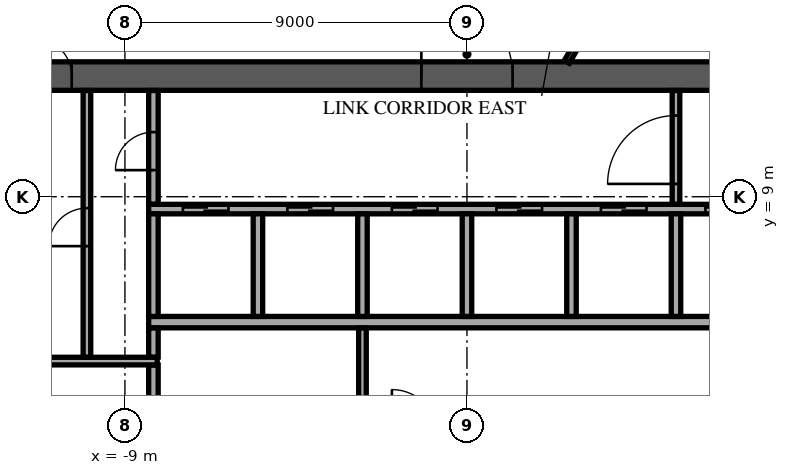
"""IFC4 building model, lengths in metres.
Left out: names, types, materials, properties, quantities, classifications, styles, units other than length and angle.
Written with IfcOpenShell. Run it as: python <this file> out.ifc"""

import sys

from ifc_helpers import new_model, si_unit, direction, frame, frame_2d, origin, place, context, subcontext, project, spatial, rectangle, extrude, element, fill, save


model = new_model("IFC4")
c1 = context("Model", 3, precision=1e-05, world=origin(), true_north=direction((0.0, 1.0)))
c2 = subcontext(c1, "Body", "Model", "MODEL_VIEW")
j1 = project(units=[si_unit("LENGTHUNIT", "METRE"), si_unit("PLANEANGLEUNIT", "RADIAN")], contexts=[c1])
p1 = place(None, origin())
s1 = spatial("IfcSite", under=j1, at=p1, CompositionType="ELEMENT")
p2 = place(p1, origin())
s2 = spatial("IfcBuilding", under=s1, at=p2, CompositionType="ELEMENT")
p3 = place(p2, frame((0.0, 0.0, 262.9)))
s3 = spatial("IfcBuildingStorey", under=s2, at=p3, CompositionType="ELEMENT", Elevation=262.9)
p4 = place(p3, frame((-12.55, 12.175, 0.0), z_axis=(0.0, 0.0, 1.0), x_axis=(1.0, 0.0, 0.0)))
e1 = element("IfcWall", 1, at=p4, inside=s3, PredefinedType="SHEAR", context=c2, shape_type="SweptSolid", body=[
    extrude(rectangle(XDim=25.1, YDim=0.75, at=frame_2d((12.55, 0.0))), origin(), (0.0, 0.0, 1.0), 3.64),
])
p5 = place(p4, frame((11.35, 0.0, 0.0)))
e2 = element("IfcOpeningElement", 2, at=p5, cuts=e1, PredefinedType="OPENING", context=c2, shape_type="SweptSolid", body=[
    extrude(rectangle(XDim=2.4, YDim=2.4, at=frame_2d((1.2, 1.2))), frame((0.0, 0.385, 0.0), z_axis=(0.0, -1.0, 0.0), x_axis=(1.0, 0.0, 0.0)), (0.0, 0.0, 1.0), 0.77),
])
p6 = place(p4, frame((22.175, 0.0, 0.0)))
e3 = element("IfcOpeningElement", 3, at=p6, cuts=e1, PredefinedType="OPENING", context=c2, shape_type="SweptSolid", body=[
    extrude(rectangle(XDim=1.2, YDim=2.1, at=frame_2d((0.6, 1.05))), frame((0.0, 0.385, 0.0), z_axis=(0.0, -1.0, 0.0), x_axis=(1.0, 0.0, 0.0)), (0.0, 0.0, 1.0), 0.77),
])
p7 = place(p4, frame((1.15, 0.0, 0.0)))
e4 = element("IfcOpeningElement", 4, at=p7, cuts=e1, PredefinedType="OPENING", context=c2, shape_type="SweptSolid", body=[
    extrude(rectangle(XDim=1.0, YDim=2.1, at=frame_2d((0.5, 1.05))), frame((0.0, 0.385, 0.0), z_axis=(0.0, -1.0, 0.0), x_axis=(1.0, 0.0, 0.0)), (0.0, 0.0, 1.0), 0.77),
])
p8 = place(p3, frame((-8.375, 5.7, 0.0), z_axis=(0.0, 0.0, 1.0), x_axis=(1.0, 0.0, 0.0)))
e5 = element("IfcWall", 5, at=p8, inside=s3, PredefinedType="SOLIDWALL", context=c2, shape_type="SweptSolid", body=[
    extrude(rectangle(XDim=16.75, YDim=0.3, at=frame_2d((8.375, 0.0))), origin(), (0.0, 0.0, 1.0), 3.64),
])
p9 = place(p3, frame((-8.375, 8.675, 0.0), z_axis=(0.0, 0.0, 1.0), x_axis=(1.0, 0.0, 0.0)))
e6 = element("IfcWall", 6, at=p9, inside=s3, PredefinedType="SOLIDWALL", context=c2, shape_type="SweptSolid", body=[
    extrude(rectangle(XDim=16.75, YDim=0.25, at=frame_2d((8.375, 0.0))), origin(), (0.0, 0.0, 1.0), 3.64),
])
p10 = place(p9, frame((0.9, 0.0, 0.0)))
e7 = element("IfcOpeningElement", 7, at=p10, cuts=e6, PredefinedType="OPENING", context=c2, shape_type="SweptSolid", body=[
    extrude(rectangle(XDim=1.2, YDim=2.1, at=frame_2d((0.6, 1.05))), frame((0.0, 0.135, 0.0), z_axis=(0.0, -1.0, 0.0), x_axis=(1.0, 0.0, 0.0)), (0.0, 0.0, 1.0), 0.27),
])
p11 = place(p9, frame((3.65, 0.0, 0.0)))
e8 = element("IfcOpeningElement", 8, at=p11, cuts=e6, PredefinedType="OPENING", context=c2, shape_type="SweptSolid", body=[
    extrude(rectangle(XDim=1.2, YDim=2.1, at=frame_2d((0.6, 1.05))), frame((0.0, 0.135, 0.0), z_axis=(0.0, -1.0, 0.0), x_axis=(1.0, 0.0, 0.0)), (0.0, 0.0, 1.0), 0.27),
])
p12 = place(p9, frame((6.4, 0.0, 0.0)))
e9 = element("IfcOpeningElement", 9, at=p12, cuts=e6, PredefinedType="OPENING", context=c2, shape_type="SweptSolid", body=[
    extrude(rectangle(XDim=1.2, YDim=2.1, at=frame_2d((0.6, 1.05))), frame((0.0, 0.135, 0.0), z_axis=(0.0, -1.0, 0.0), x_axis=(1.0, 0.0, 0.0)), (0.0, 0.0, 1.0), 0.27),
])
p13 = place(p9, frame((9.15, 0.0, 0.0)))
e10 = element("IfcOpeningElement", 10, at=p13, cuts=e6, PredefinedType="OPENING", context=c2, shape_type="SweptSolid", body=[
    extrude(rectangle(XDim=1.2, YDim=2.1, at=frame_2d((0.6, 1.05))), frame((0.0, 0.135, 0.0), z_axis=(0.0, -1.0, 0.0), x_axis=(1.0, 0.0, 0.0)), (0.0, 0.0, 1.0), 0.27),
])
p14 = place(p9, frame((11.9, 0.0, 0.0)))
e11 = element("IfcOpeningElement", 11, at=p14, cuts=e6, PredefinedType="OPENING", context=c2, shape_type="SweptSolid", body=[
    extrude(rectangle(XDim=1.2, YDim=2.1, at=frame_2d((0.6, 1.05))), frame((0.0, 0.135, 0.0), z_axis=(0.0, -1.0, 0.0), x_axis=(1.0, 0.0, 0.0)), (0.0, 0.0, 1.0), 0.27),
])
p15 = place(p9, frame((14.65, 0.0, 0.0)))
e12 = element("IfcOpeningElement", 12, at=p15, cuts=e6, PredefinedType="OPENING", context=c2, shape_type="SweptSolid", body=[
    extrude(rectangle(XDim=1.2, YDim=2.1, at=frame_2d((0.6, 1.05))), frame((0.0, 0.135, 0.0), z_axis=(0.0, -1.0, 0.0), x_axis=(1.0, 0.0, 0.0)), (0.0, 0.0, 1.0), 0.27),
])
for number, where, z_axis, x_axis in (
    (13, (-8.25, 5.85, 0.0), (0.0, 0.0, 1.0), (0.0, 1.0, 0.0)),
    (14, (-5.5, 5.85, 0.0), (0.0, 0.0, 1.0), (0.0, 1.0, 0.0)),
    (15, (-2.75, 5.85, 0.0), (0.0, 0.0, 1.0), (0.0, 1.0, 0.0)),
    (16, (0.0, 5.85, 0.0), (0.0, 0.0, 1.0), (0.0, 1.0, 0.0)),
    (17, (2.75, 5.85, 0.0), (0.0, 0.0, 1.0), (0.0, 1.0, 0.0)),
    (18, (5.5, 5.85, 0.0), (0.0, 0.0, 1.0), (0.0, 1.0, 0.0)),
):
    element("IfcWall", number, at=place(p3, frame(where, z_axis=z_axis, x_axis=x_axis)), inside=s3, PredefinedType="SOLIDWALL", context=c2, shape_type="SweptSolid", body=[
        extrude(rectangle(XDim=2.7, YDim=0.25, at=frame_2d((1.35, 0.0))), origin(), (0.0, 0.0, 1.0), 3.64),
    ])
p16 = place(p3, frame((-8.25, 2.855, 0.0), z_axis=(0.0, 0.0, 1.0), x_axis=(0.0, 1.0, 0.0)))
e19 = element("IfcWall", 19, at=p16, inside=s3, PredefinedType="PARTITIONING", context=c2, shape_type="SweptSolid", body=[
    extrude(rectangle(XDim=1.715, YDim=0.25, at=frame_2d((0.857, 0.0))), origin(), (0.0, 0.0, 1.0), 3.64),
])
p17 = place(p3, frame((-2.75, 2.855, 0.0), z_axis=(0.0, 0.0, 1.0), x_axis=(0.0, 1.0, 0.0)))
e20 = element("IfcWall", 20, at=p17, inside=s3, PredefinedType="PARTITIONING", context=c2, shape_type="SweptSolid", body=[
    extrude(rectangle(XDim=2.69, YDim=0.2, at=frame_2d((1.345, 0.0))), origin(), (0.0, 0.0, 1.0), 3.64),
])
p18 = place(p3, frame((-11.795, 4.675, 0.0), z_axis=(0.0, 0.0, 1.0), x_axis=(1.0, 0.0, 0.0)))
e21 = element("IfcWall", 21, at=p18, inside=s3, PredefinedType="PARTITIONING", context=c2, shape_type="SweptSolid", body=[
    extrude(rectangle(XDim=3.645, YDim=0.2, at=frame_2d((1.823, 0.0))), origin(), (0.0, 0.0, 1.0), 3.64),
])
p19 = place(p3, frame((-10.0, 4.78, 0.0), z_axis=(0.0, 0.0, 1.0), x_axis=(0.0, 1.0, 0.0)))
e22 = element("IfcWall", 22, at=p19, inside=s3, PredefinedType="PARTITIONING", context=c2, shape_type="SweptSolid", body=[
    extrude(rectangle(XDim=7.015, YDim=0.2, at=frame_2d((3.507, 0.0))), origin(), (0.0, 0.0, 1.0), 3.64),
])
p20 = place(p19, frame((2.92, 0.0, 0.0)))
e23 = element("IfcOpeningElement", 23, at=p20, cuts=e22, PredefinedType="OPENING", context=c2, shape_type="SweptSolid", body=[
    extrude(rectangle(XDim=1.0, YDim=2.1, at=frame_2d((0.5, 1.05))), frame((0.0, 0.11, 0.0), z_axis=(0.0, -1.0, 0.0), x_axis=(1.0, 0.0, 0.0)), (0.0, 0.0, 1.0), 0.22),
])
p21 = place(p3, frame((-8.25, 4.78, 0.0), z_axis=(0.0, 0.0, 1.0), x_axis=(0.0, 1.0, 0.0)))
e24 = element("IfcWall", 24, at=p21, inside=s3, PredefinedType="PARTITIONING", context=c2, shape_type="SweptSolid", body=[
    extrude(rectangle(XDim=0.765, YDim=0.25, at=frame_2d((0.382, 0.0))), origin(), (0.0, 0.0, 1.0), 3.64),
])
p22 = place(p3, frame((-8.25, 8.805, 0.0), z_axis=(0.0, 0.0, 1.0), x_axis=(0.0, 1.0, 0.0)))
e25 = element("IfcWall", 25, at=p22, inside=s3, PredefinedType="PARTITIONING", context=c2, shape_type="SweptSolid", body=[
    extrude(rectangle(XDim=2.99, YDim=0.25, at=frame_2d((1.495, 0.0))), origin(), (0.0, 0.0, 1.0), 3.64),
])
p23 = place(p22, frame((0.895, 0.0, 0.0)))
e26 = element("IfcOpeningElement", 26, at=p23, cuts=e25, PredefinedType="OPENING", context=c2, shape_type="SweptSolid", body=[
    extrude(rectangle(XDim=1.0, YDim=2.1, at=frame_2d((0.5, 1.05))), frame((0.0, 0.135, 0.0), z_axis=(0.0, -1.0, 0.0), x_axis=(1.0, 0.0, 0.0)), (0.0, 0.0, 1.0), 0.27),
])
p24 = place(p3, frame((5.5, 8.805, 0.0), z_axis=(0.0, 0.0, 1.0), x_axis=(0.0, 1.0, 0.0)))
e27 = element("IfcWall", 27, at=p24, inside=s3, PredefinedType="PARTITIONING", context=c2, shape_type="SweptSolid", body=[
    extrude(rectangle(XDim=2.99, YDim=0.2, at=frame_2d((1.495, 0.0))), origin(), (0.0, 0.0, 1.0), 3.64),
])
p25 = place(p24, frame((0.532, 0.0, 0.0)))
e28 = element("IfcOpeningElement", 28, at=p25, cuts=e27, PredefinedType="OPENING", context=c2, shape_type="SweptSolid", body=[
    extrude(rectangle(XDim=1.8, YDim=2.1, at=frame_2d((0.9, 1.05))), frame((0.0, 0.11, 0.0), z_axis=(0.0, -1.0, 0.0), x_axis=(1.0, 0.0, 0.0)), (0.0, 0.0, 1.0), 0.22),
])
p26 = place(p3, frame((-8.015, 32.917, 0.0), z_axis=(0.0, 0.0, 1.0), x_axis=(-0.500001675963, -0.866024436165, 0.0)))
e29 = element("IfcWall", 29, at=p26, inside=s3, PredefinedType="STANDARD", context=c2, shape_type="SweptSolid", body=[
    extrude(rectangle(XDim=48.843, YDim=0.6, at=frame_2d((24.421, 0.0))), origin(), (0.0, 0.0, 1.0), 3.64),
])
p27 = place(p26, frame((1.22, 0.0, 0.9)))
e30 = element("IfcOpeningElement", 30, at=p27, cuts=e29, PredefinedType="OPENING", context=c2, shape_type="SweptSolid", body=[
    extrude(rectangle(XDim=2.0, YDim=2.1, at=frame_2d((1.0, 1.05))), frame((0.0, 0.31, 0.0), z_axis=(0.0, -1.0, 0.0), x_axis=(1.0, 0.0, 0.0)), (0.0, 0.0, 1.0), 0.62),
])
p28 = place(p26, frame((5.66, 0.0, 0.9)))
e31 = element("IfcOpeningElement", 31, at=p28, cuts=e29, PredefinedType="OPENING", context=c2, shape_type="SweptSolid", body=[
    extrude(rectangle(XDim=2.0, YDim=2.1, at=frame_2d((1.0, 1.05))), frame((0.0, 0.31, 0.0), z_axis=(0.0, -1.0, 0.0), x_axis=(1.0, 0.0, 0.0)), (0.0, 0.0, 1.0), 0.62),
])
p29 = place(p26, frame((10.101, 0.0, 0.9)))
e32 = element("IfcOpeningElement", 32, at=p29, cuts=e29, PredefinedType="OPENING", context=c2, shape_type="SweptSolid", body=[
    extrude(rectangle(XDim=2.0, YDim=2.1, at=frame_2d((1.0, 1.05))), frame((0.0, 0.31, 0.0), z_axis=(0.0, -1.0, 0.0), x_axis=(1.0, 0.0, 0.0)), (0.0, 0.0, 1.0), 0.62),
])
p30 = place(p26, frame((14.541, 0.0, 0.9)))
e33 = element("IfcOpeningElement", 33, at=p30, cuts=e29, PredefinedType="OPENING", context=c2, shape_type="SweptSolid", body=[
    extrude(rectangle(XDim=2.0, YDim=2.1, at=frame_2d((1.0, 1.05))), frame((0.0, 0.31, 0.0), z_axis=(0.0, -1.0, 0.0), x_axis=(1.0, 0.0, 0.0)), (0.0, 0.0, 1.0), 0.62),
])
p31 = place(p26, frame((18.981, 0.0, 0.9)))
e34 = element("IfcOpeningElement", 34, at=p31, cuts=e29, PredefinedType="OPENING", context=c2, shape_type="SweptSolid", body=[
    extrude(rectangle(XDim=2.0, YDim=2.1, at=frame_2d((1.0, 1.05))), frame((0.0, 0.31, 0.0), z_axis=(0.0, -1.0, 0.0), x_axis=(1.0, 0.0, 0.0)), (0.0, 0.0, 1.0), 0.62),
])
p32 = place(p26, frame((23.422, 0.0, 0.9)))
e35 = element("IfcOpeningElement", 35, at=p32, cuts=e29, PredefinedType="OPENING", context=c2, shape_type="SweptSolid", body=[
    extrude(rectangle(XDim=2.0, YDim=2.1, at=frame_2d((1.0, 1.05))), frame((0.0, 0.31, 0.0), z_axis=(0.0, -1.0, 0.0), x_axis=(1.0, 0.0, 0.0)), (0.0, 0.0, 1.0), 0.62),
])
p33 = place(p26, frame((27.862, 0.0, 0.9)))
e36 = element("IfcOpeningElement", 36, at=p33, cuts=e29, PredefinedType="OPENING", context=c2, shape_type="SweptSolid", body=[
    extrude(rectangle(XDim=2.0, YDim=2.1, at=frame_2d((1.0, 1.05))), frame((0.0, 0.31, 0.0), z_axis=(0.0, -1.0, 0.0), x_axis=(1.0, 0.0, 0.0)), (0.0, 0.0, 1.0), 0.62),
])
p34 = place(p26, frame((32.302, 0.0, 0.9)))
e37 = element("IfcOpeningElement", 37, at=p34, cuts=e29, PredefinedType="OPENING", context=c2, shape_type="SweptSolid", body=[
    extrude(rectangle(XDim=2.0, YDim=2.1, at=frame_2d((1.0, 1.05))), frame((0.0, 0.31, 0.0), z_axis=(0.0, -1.0, 0.0), x_axis=(1.0, 0.0, 0.0)), (0.0, 0.0, 1.0), 0.62),
])
p35 = place(p26, frame((36.742, 0.0, 0.9)))
e38 = element("IfcOpeningElement", 38, at=p35, cuts=e29, PredefinedType="OPENING", context=c2, shape_type="SweptSolid", body=[
    extrude(rectangle(XDim=2.0, YDim=2.1, at=frame_2d((1.0, 1.05))), frame((0.0, 0.31, 0.0), z_axis=(0.0, -1.0, 0.0), x_axis=(1.0, 0.0, 0.0)), (0.0, 0.0, 1.0), 0.62),
])
p36 = place(p26, frame((41.183, 0.0, 0.9)))
e39 = element("IfcOpeningElement", 39, at=p36, cuts=e29, PredefinedType="OPENING", context=c2, shape_type="SweptSolid", body=[
    extrude(rectangle(XDim=2.0, YDim=2.1, at=frame_2d((1.0, 1.05))), frame((0.0, 0.31, 0.0), z_axis=(0.0, -1.0, 0.0), x_axis=(1.0, 0.0, 0.0)), (0.0, 0.0, 1.0), 0.62),
])
p37 = place(p26, frame((45.623, 0.0, 0.9)))
e40 = element("IfcOpeningElement", 40, at=p37, cuts=e29, PredefinedType="OPENING", context=c2, shape_type="SweptSolid", body=[
    extrude(rectangle(XDim=2.0, YDim=2.1, at=frame_2d((1.0, 1.05))), frame((0.0, 0.31, 0.0), z_axis=(0.0, -1.0, 0.0), x_axis=(1.0, 0.0, 0.0)), (0.0, 0.0, 1.0), 0.62),
])
p38 = place(p3, frame((-7.247, 26.698, 0.0), z_axis=(0.0, 0.0, 1.0), x_axis=(0.866022442497, -0.500005129065, 0.0)))
e41 = element("IfcWall", 41, at=p38, inside=s3, PredefinedType="PARTITIONING", context=c2, shape_type="SweptSolid", body=[
    extrude(rectangle(XDim=39.325, YDim=0.15, at=frame_2d((19.662, 0.0))), origin(), (0.0, 0.0, 1.0), 3.04),
])
p39 = place(p38, frame((15.654, 0.0, 0.0)))
e42 = element("IfcOpeningElement", 42, at=p39, cuts=e41, PredefinedType="OPENING", context=c2, shape_type="SweptSolid", body=[
    extrude(rectangle(XDim=1.0, YDim=2.1, at=frame_2d((0.5, 1.05))), frame((0.0, 0.085, 0.0), z_axis=(0.0, -1.0, 0.0), x_axis=(1.0, 0.0, 0.0)), (0.0, 0.0, 1.0), 0.17),
])
p40 = place(p38, frame((23.442, 0.0, 0.0)))
e43 = element("IfcOpeningElement", 43, at=p40, cuts=e41, PredefinedType="OPENING", context=c2, shape_type="SweptSolid", body=[
    extrude(rectangle(XDim=1.0, YDim=2.1, at=frame_2d((0.5, 1.05))), frame((0.0, 0.085, 0.0), z_axis=(0.0, -1.0, 0.0), x_axis=(1.0, 0.0, 0.0)), (0.0, 0.0, 1.0), 0.17),
])
p41 = place(p38, frame((31.841, 0.0, 0.0)))
e44 = element("IfcOpeningElement", 44, at=p41, cuts=e41, PredefinedType="OPENING", context=c2, shape_type="SweptSolid", body=[
    extrude(rectangle(XDim=1.0, YDim=2.1, at=frame_2d((0.5, 1.05))), frame((0.0, 0.085, 0.0), z_axis=(0.0, -1.0, 0.0), x_axis=(1.0, 0.0, 0.0)), (0.0, 0.0, 1.0), 0.17),
])
p42 = place(p38, frame((36.955, 0.0, 0.0)))
e45 = element("IfcOpeningElement", 45, at=p42, cuts=e41, PredefinedType="OPENING", context=c2, shape_type="SweptSolid", body=[
    extrude(rectangle(XDim=1.0, YDim=2.1, at=frame_2d((0.5, 1.05))), frame((0.0, 0.085, 0.0), z_axis=(0.0, -1.0, 0.0), x_axis=(1.0, 0.0, 0.0)), (0.0, 0.0, 1.0), 0.17),
])
p43 = place(p3, frame((2.627, 12.55, 0.0), z_axis=(0.0, 0.0, 1.0), x_axis=(0.50013524008, 0.865947308807, 0.0)))
e46 = element("IfcWall", 46, at=p43, inside=s3, PredefinedType="PARTITIONING", context=c2, shape_type="SweptSolid", body=[
    extrude(rectangle(XDim=4.915, YDim=0.15, at=frame_2d((2.458, 0.0))), origin(), (0.0, 0.0, 1.0), 3.24),
])
p44 = place(p3, frame((5.15, 16.769, 0.0), z_axis=(0.0, 0.0, 1.0), x_axis=(0.866010168016, -0.500026388196, 0.0)))
e47 = element("IfcWall", 47, at=p44, inside=s3, PredefinedType="PARTITIONING", context=c2, shape_type="SweptSolid", body=[
    extrude(rectangle(XDim=8.437, YDim=0.15, at=frame_2d((4.218, 0.0))), origin(), (0.0, 0.0, 1.0), 3.24),
])
p45 = place(p44, frame((3.3, 0.0, 0.0)))
e48 = element("IfcOpeningElement", 48, at=p45, cuts=e47, PredefinedType="OPENING", context=c2, shape_type="SweptSolid", body=[
    extrude(rectangle(XDim=1.0, YDim=2.1, at=frame_2d((0.5, 1.05))), frame((0.0, 0.085, 0.0), z_axis=(0.0, -1.0, 0.0), x_axis=(1.0, 0.0, 0.0)), (0.0, 0.0, 1.0), 0.17),
])
p46 = place(p5, origin())
e49 = element("IfcDoor", 49, at=p46, inside=s3, OperationType="SINGLE_SWING_LEFT", PredefinedType="DOOR", context=c2, shape_type="SweptSolid", body=[
    extrude(rectangle(XDim=2.4, YDim=2.4, at=frame_2d((1.2, 1.2))), frame((0.0, 0.025, 0.0), z_axis=(0.0, -1.0, 0.0), x_axis=(1.0, 0.0, 0.0)), (0.0, 0.0, 1.0), 0.05),
])
fill(e2, e49)
p47 = place(p7, origin())
e50 = element("IfcDoor", 50, at=p47, inside=s3, OperationType="SINGLE_SWING_LEFT", PredefinedType="DOOR", context=c2, shape_type="SweptSolid", body=[
    extrude(rectangle(XDim=1.0, YDim=2.1, at=frame_2d((0.5, 1.05))), frame((0.0, 0.025, 0.0), z_axis=(0.0, -1.0, 0.0), x_axis=(1.0, 0.0, 0.0)), (0.0, 0.0, 1.0), 0.05),
])
fill(e4, e50)
p48 = place(p10, origin())
e51 = element("IfcDoor", 51, at=p48, inside=s3, OperationType="DOUBLE_DOOR_SLIDING", PredefinedType="DOOR", context=c2, shape_type="SweptSolid", body=[
    extrude(rectangle(XDim=1.2, YDim=2.1, at=frame_2d((0.6, 1.05))), frame((0.0, 0.025, 0.0), z_axis=(0.0, -1.0, 0.0), x_axis=(1.0, 0.0, 0.0)), (0.0, 0.0, 1.0), 0.05),
])
fill(e7, e51)
p49 = place(p11, origin())
e52 = element("IfcDoor", 52, at=p49, inside=s3, OperationType="DOUBLE_DOOR_SLIDING", PredefinedType="DOOR", context=c2, shape_type="SweptSolid", body=[
    extrude(rectangle(XDim=1.2, YDim=2.1, at=frame_2d((0.6, 1.05))), frame((0.0, 0.025, 0.0), z_axis=(0.0, -1.0, 0.0), x_axis=(1.0, 0.0, 0.0)), (0.0, 0.0, 1.0), 0.05),
])
fill(e8, e52)
p50 = place(p12, origin())
e53 = element("IfcDoor", 53, at=p50, inside=s3, OperationType="DOUBLE_DOOR_SLIDING", PredefinedType="DOOR", context=c2, shape_type="SweptSolid", body=[
    extrude(rectangle(XDim=1.2, YDim=2.1, at=frame_2d((0.6, 1.05))), frame((0.0, 0.025, 0.0), z_axis=(0.0, -1.0, 0.0), x_axis=(1.0, 0.0, 0.0)), (0.0, 0.0, 1.0), 0.05),
])
fill(e9, e53)
p51 = place(p13, origin())
e54 = element("IfcDoor", 54, at=p51, inside=s3, OperationType="DOUBLE_DOOR_SLIDING", PredefinedType="DOOR", context=c2, shape_type="SweptSolid", body=[
    extrude(rectangle(XDim=1.2, YDim=2.1, at=frame_2d((0.6, 1.05))), frame((0.0, 0.025, 0.0), z_axis=(0.0, -1.0, 0.0), x_axis=(1.0, 0.0, 0.0)), (0.0, 0.0, 1.0), 0.05),
])
fill(e10, e54)
p52 = place(p14, origin())
e55 = element("IfcDoor", 55, at=p52, inside=s3, OperationType="DOUBLE_DOOR_SLIDING", PredefinedType="DOOR", context=c2, shape_type="SweptSolid", body=[
    extrude(rectangle(XDim=1.2, YDim=2.1, at=frame_2d((0.6, 1.05))), frame((0.0, 0.025, 0.0), z_axis=(0.0, -1.0, 0.0), x_axis=(1.0, 0.0, 0.0)), (0.0, 0.0, 1.0), 0.05),
])
fill(e11, e55)
p53 = place(p15, origin())
e56 = element("IfcDoor", 56, at=p53, inside=s3, OperationType="DOUBLE_DOOR_SLIDING", PredefinedType="DOOR", context=c2, shape_type="SweptSolid", body=[
    extrude(rectangle(XDim=1.2, YDim=2.1, at=frame_2d((0.6, 1.05))), frame((0.0, 0.025, 0.0), z_axis=(0.0, -1.0, 0.0), x_axis=(1.0, 0.0, 0.0)), (0.0, 0.0, 1.0), 0.05),
])
fill(e12, e56)
p54 = place(p20, origin())
e57 = element("IfcDoor", 57, at=p54, inside=s3, OperationType="SINGLE_SWING_LEFT", PredefinedType="DOOR", context=c2, shape_type="SweptSolid", body=[
    extrude(rectangle(XDim=1.0, YDim=2.1, at=frame_2d((0.5, 1.05))), frame((0.0, 0.025, 0.0), z_axis=(0.0, -1.0, 0.0), x_axis=(1.0, 0.0, 0.0)), (0.0, 0.0, 1.0), 0.05),
])
fill(e23, e57)
p55 = place(p23, origin())
e58 = element("IfcDoor", 58, at=p55, inside=s3, OperationType="SINGLE_SWING_LEFT", PredefinedType="DOOR", context=c2, shape_type="SweptSolid", body=[
    extrude(rectangle(XDim=1.0, YDim=2.1, at=frame_2d((0.5, 1.05))), frame((0.0, 0.025, 0.0), z_axis=(0.0, -1.0, 0.0), x_axis=(1.0, 0.0, 0.0)), (0.0, 0.0, 1.0), 0.05),
])
fill(e26, e58)
p56 = place(p25, origin())
e59 = element("IfcDoor", 59, at=p56, inside=s3, OperationType="SINGLE_SWING_LEFT", PredefinedType="DOOR", context=c2, shape_type="SweptSolid", body=[
    extrude(rectangle(XDim=1.8, YDim=2.1, at=frame_2d((0.9, 1.05))), frame((0.0, 0.025, 0.0), z_axis=(0.0, -1.0, 0.0), x_axis=(1.0, 0.0, 0.0)), (0.0, 0.0, 1.0), 0.05),
])
fill(e28, e59)
save(model, sys.argv[1])
